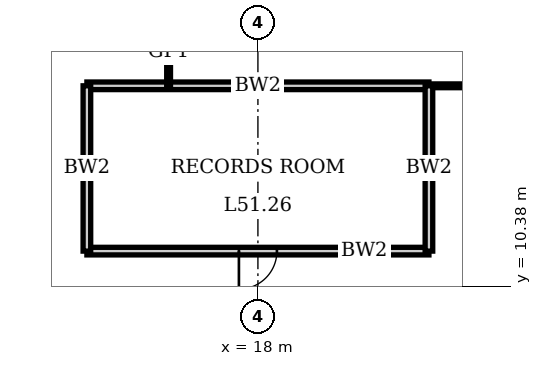
"""IFC4 building model, lengths in metres.
Left out: names, types, materials, properties, quantities, classifications, styles, units other than length and angle.
Written with IfcOpenShell. Run it as: python <this file> out.ifc"""

import sys

from ifc_helpers import new_model, si_unit, direction, frame, frame_2d, origin, place, context, subcontext, project, spatial, rectangle, extrude, element, fill, save


model = new_model("IFC4")
c1 = context("Model", 3, precision=1e-05, world=origin(), true_north=direction((0.0, 1.0)))
c2 = subcontext(c1, "Body", "Model", "MODEL_VIEW")
j1 = project(units=[si_unit("LENGTHUNIT", "METRE"), si_unit("PLANEANGLEUNIT", "RADIAN")], contexts=[c1])
p1 = place(None, origin())
s1 = spatial("IfcSite", under=j1, at=p1, CompositionType="ELEMENT")
p2 = place(p1, origin())
s2 = spatial("IfcBuilding", under=s1, at=p2, CompositionType="ELEMENT")
p3 = place(p2, frame((0.0, 0.0, 210.2)))
s3 = spatial("IfcBuildingStorey", under=s2, at=p3, CompositionType="ELEMENT", Elevation=210.2)
p4 = place(p3, frame((13.5, 11.3, 0.0), z_axis=(0.0, 0.0, 1.0), x_axis=(1.0, 0.0, 0.0)))
e1 = element("IfcWall", 1, at=p4, inside=s3, PredefinedType="SOLIDWALL", context=c2, shape_type="SweptSolid", body=[
    extrude(rectangle(XDim=9.0, YDim=0.2, at=frame_2d((4.5, 0.0))), origin(), (0.0, 0.0, 1.0), 3.75),
])
p5 = place(p4, frame((4.0, 0.0, 0.0)))
e2 = element("IfcOpeningElement", 2, at=p5, cuts=e1, PredefinedType="OPENING", context=c2, shape_type="SweptSolid", body=[
    extrude(rectangle(XDim=1.0, YDim=2.4, at=frame_2d((0.5, 1.2))), frame((0.0, 0.11, 0.0), z_axis=(0.0, -1.0, 0.0), x_axis=(1.0, 0.0, 0.0)), (0.0, 0.0, 1.0), 0.22),
])
p6 = place(p3, frame((13.5, 15.65, 0.0), z_axis=(0.0, 0.0, 1.0), x_axis=(1.0, 0.0, 0.0)))
e3 = element("IfcWall", 3, at=p6, inside=s3, PredefinedType="SOLIDWALL", context=c2, shape_type="SweptSolid", body=[
    extrude(rectangle(XDim=9.0, YDim=0.2, at=frame_2d((4.5, 0.0))), origin(), (0.0, 0.0, 1.0), 3.75),
])
p7 = place(p3, frame((22.5, 15.65, 0.0), z_axis=(0.0, 0.0, 1.0), x_axis=(1.0, 0.0, 0.0)))
e4 = element("IfcWall", 4, at=p7, inside=s3, PredefinedType="PARTITIONING", context=c2, shape_type="SweptSolid", body=[
    extrude(rectangle(XDim=24.85, YDim=0.1, at=frame_2d((12.425, 0.0))), origin(), (0.0, 0.0, 1.0), 3.75),
])
p8 = place(p7, frame((11.925, 0.0, 0.0)))
e5 = element("IfcOpeningElement", 5, at=p8, cuts=e4, PredefinedType="OPENING", context=c2, shape_type="SweptSolid", body=[
    extrude(rectangle(XDim=1.0, YDim=2.4, at=frame_2d((0.5, 1.2))), frame((0.0, 0.06, 0.0), z_axis=(0.0, -1.0, 0.0), x_axis=(1.0, 0.0, 0.0)), (0.0, 0.0, 1.0), 0.12),
])
p9 = place(p3, frame((13.5, 11.3, 0.0), z_axis=(0.0, 0.0, 1.0), x_axis=(0.0, 1.0, 0.0)))
e6 = element("IfcWall", 6, at=p9, inside=s3, PredefinedType="SOLIDWALL", context=c2, shape_type="SweptSolid", body=[
    extrude(rectangle(XDim=4.35, YDim=0.2, at=frame_2d((2.175, 0.0))), origin(), (0.0, 0.0, 1.0), 3.75),
])
p10 = place(p3, frame((15.65, 15.65, 0.0), z_axis=(0.0, 0.0, 1.0), x_axis=(0.0, 1.0, 0.0)))
e7 = element("IfcWall", 7, at=p10, inside=s3, PredefinedType="PARTITIONING", context=c2, shape_type="SweptSolid", body=[
    extrude(rectangle(XDim=1.8, YDim=0.1, at=frame_2d((0.9, 0.0))), origin(), (0.0, 0.0, 1.0), 3.75),
])
p11 = place(p3, frame((22.5, 11.3, 0.0), z_axis=(0.0, 0.0, 1.0), x_axis=(0.0, 1.0, 0.0)))
e8 = element("IfcWall", 8, at=p11, inside=s3, PredefinedType="SOLIDWALL", context=c2, shape_type="SweptSolid", body=[
    extrude(rectangle(XDim=4.35, YDim=0.2, at=frame_2d((2.175, 0.0))), origin(), (0.0, 0.0, 1.0), 3.75),
])
p12 = place(p5, origin())
e9 = element("IfcDoor", 9, at=p12, inside=s3, OperationType="SINGLE_SWING_LEFT", PredefinedType="DOOR", context=c2, shape_type="SweptSolid", body=[
    extrude(rectangle(XDim=1.0, YDim=2.4, at=frame_2d((0.5, 1.2))), frame((0.0, 0.035, 0.0), z_axis=(0.0, -1.0, 0.0), x_axis=(1.0, 0.0, 0.0)), (0.0, 0.0, 1.0), 0.07),
])
fill(e2, e9)
save(model, sys.argv[1])
